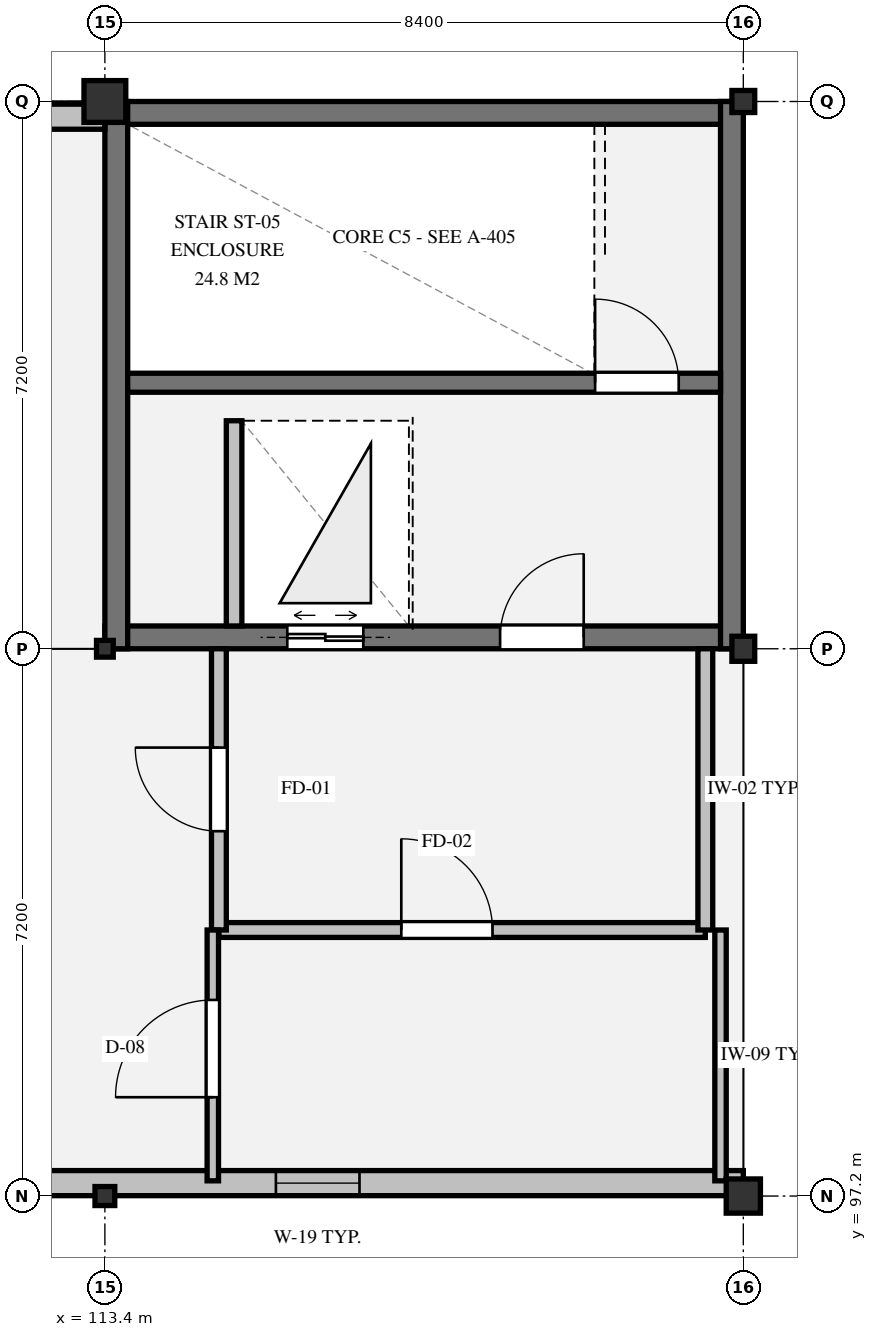
"""IFC4 building model, lengths in metres.
Left out: names, types, materials, properties, quantities, classifications, styles, units other than length and angle.
Written with IfcOpenShell. Run it as: python <this file> out.ifc"""

import sys

from ifc_helpers import new_model, si_unit, direction, frame, frame_2d, origin, origin_2d, place, context, subcontext, project, spatial, rectangle, hollow_rectangle, i_section, extrude, element, fill, save


model = new_model("IFC4")
c1 = context("Model", 3, precision=1e-05, world=origin(), true_north=direction((0.0, 1.0)))
c2 = subcontext(c1, "Body", "Model", "MODEL_VIEW")
j1 = project(units=[si_unit("LENGTHUNIT", "METRE"), si_unit("PLANEANGLEUNIT", "RADIAN")], contexts=[c1])
p1 = place(None, origin())
s1 = spatial("IfcSite", under=j1, at=p1, CompositionType="ELEMENT")
p2 = place(p1, origin())
s2 = spatial("IfcBuilding", under=s1, at=p2, CompositionType="ELEMENT")
p3 = place(p2, frame((0.0, 0.0, 29.4)))
s3 = spatial("IfcBuildingStorey", under=s2, at=p3, CompositionType="ELEMENT", Elevation=29.4)
p4 = place(p3, frame((113.4, 111.45, 0.0), z_axis=(0.0, 0.0, 1.0), x_axis=(1.0, 0.0, 0.0)))
e1 = element("IfcWall", 1, at=p4, inside=s3, PredefinedType="SHEAR", context=c2, shape_type="SweptSolid", body=[
    extrude(rectangle(XDim=8.4, YDim=0.3, at=frame_2d((4.2, 0.0))), origin(), (0.0, 0.0, 1.0), 4.5),
])
p5 = place(p3, frame((113.4, 104.55, 0.0), z_axis=(0.0, 0.0, 1.0), x_axis=(1.0, 0.0, 0.0)))
e2 = element("IfcWall", 2, at=p5, inside=s3, PredefinedType="SHEAR", context=c2, shape_type="SweptSolid", body=[
    extrude(rectangle(XDim=8.4, YDim=0.3, at=frame_2d((4.2, 0.0))), origin(), (0.0, 0.0, 1.0), 4.5),
])
p6 = place(p5, frame((5.2, 0.0, 0.0)))
e3 = element("IfcOpeningElement", 3, at=p6, cuts=e2, PredefinedType="OPENING", context=c2, shape_type="SweptSolid", body=[
    extrude(rectangle(XDim=1.1, YDim=2.15, at=frame_2d((0.55, 1.075))), frame((0.0, 0.16, 0.0), z_axis=(0.0, -1.0, 0.0), x_axis=(1.0, 0.0, 0.0)), (0.0, 0.0, 1.0), 0.32),
])
p7 = place(p5, frame((2.4, 0.0, 0.0)))
e4 = element("IfcOpeningElement", 4, at=p7, cuts=e2, PredefinedType="OPENING", context=c2, shape_type="SweptSolid", body=[
    extrude(rectangle(XDim=1.0, YDim=2.1, at=frame_2d((0.5, 1.05))), frame((0.0, 0.16, 0.0), z_axis=(0.0, -1.0, 0.0), x_axis=(1.0, 0.0, 0.0)), (0.0, 0.0, 1.0), 0.32),
])
for number, where, z_axis, x_axis in (
    (5, (113.55, 104.4, 0.0), (0.0, 0.0, 1.0), (0.0, 1.0, 0.0)),
    (6, (121.65, 111.6, 0.0), (0.0, 0.0, 1.0), (0.0, -1.0, 0.0)),
):
    element("IfcWall", number, at=place(p3, frame(where, z_axis=z_axis, x_axis=x_axis)), inside=s3, PredefinedType="SHEAR", context=c2, shape_type="SweptSolid", body=[
        extrude(rectangle(XDim=7.2, YDim=0.3, at=frame_2d((3.6, 0.0))), origin(), (0.0, 0.0, 1.0), 4.5),
    ])
p8 = place(p3, frame((113.7, 107.9, 0.0), z_axis=(0.0, 0.0, 1.0), x_axis=(1.0, 0.0, 0.0)))
e7 = element("IfcWall", 7, at=p8, inside=s3, PredefinedType="SHEAR", context=c2, shape_type="SweptSolid", body=[
    extrude(rectangle(XDim=7.8, YDim=0.25, at=frame_2d((3.9, 0.0))), origin(), (0.0, 0.0, 1.0), 4.5),
])
p9 = place(p8, frame((6.15, 0.0, 0.0)))
e8 = element("IfcOpeningElement", 8, at=p9, cuts=e7, PredefinedType="OPENING", context=c2, shape_type="SweptSolid", body=[
    extrude(rectangle(XDim=1.1, YDim=2.15, at=frame_2d((0.55, 1.075))), frame((0.0, 0.135, 0.0), z_axis=(0.0, -1.0, 0.0), x_axis=(1.0, 0.0, 0.0)), (0.0, 0.0, 1.0), 0.27),
])
p10 = place(p3, frame((113.4, 97.2, 0.0), z_axis=(0.0, 0.0, 1.0), x_axis=(1.0, 0.0, 0.0)))
e9 = element("IfcColumn", 9, at=p10, inside=s3, PredefinedType="COLUMN", context=c2, shape_type="SweptSolid", body=[
    extrude(i_section(OverallWidth=0.26, OverallDepth=0.25, WebThickness=0.008, FlangeThickness=0.012, FilletRadius=0.024, at=origin_2d()), origin(), (0.0, 0.0, 1.0), 4.5),
])
p11 = place(p3, frame((113.4, 104.4, 0.0), z_axis=(0.0, 0.0, 1.0), x_axis=(1.0, 0.0, 0.0)))
e10 = element("IfcColumn", 10, at=p11, inside=s3, PredefinedType="COLUMN", context=c2, shape_type="SweptSolid", body=[
    extrude(hollow_rectangle(XDim=0.22, YDim=0.22, WallThickness=0.012, InnerFilletRadius=0.019, OuterFilletRadius=0.031, at=origin_2d()), origin(), (0.0, 0.0, 1.0), 4.5),
])
p12 = place(p3, frame((113.4, 111.6, 0.0), z_axis=(0.0, 0.0, 1.0), x_axis=(1.0, 0.0, 0.0)))
e11 = element("IfcColumn", 11, at=p12, inside=s3, PredefinedType="COLUMN", context=c2, shape_type="SweptSolid", body=[
    extrude(rectangle(XDim=0.55, YDim=0.55, at=origin_2d()), origin(), (0.0, 0.0, 1.0), 4.5),
])
p13 = place(p3, frame((121.8, 97.2, 0.0), z_axis=(0.0, 0.0, 1.0), x_axis=(1.0, 0.0, 0.0)))
e12 = element("IfcColumn", 12, at=p13, inside=s3, PredefinedType="COLUMN", context=c2, shape_type="SweptSolid", body=[
    extrude(rectangle(XDim=0.45, YDim=0.45, at=origin_2d()), origin(), (0.0, 0.0, 1.0), 4.5),
])
p14 = place(p3, frame((121.8, 104.4, 0.0), z_axis=(0.0, 0.0, 1.0), x_axis=(1.0, 0.0, 0.0)))
e13 = element("IfcColumn", 13, at=p14, inside=s3, PredefinedType="COLUMN", context=c2, shape_type="SweptSolid", body=[
    extrude(i_section(OverallWidth=0.3, OverallDepth=0.33, WebThickness=0.01, FlangeThickness=0.017, FilletRadius=0.027, at=origin_2d()), origin(), (0.0, 0.0, 1.0), 4.95),
])
p15 = place(p3, frame((121.8, 111.6, 0.0), z_axis=(0.0, 0.0, 1.0), x_axis=(1.0, 0.0, 0.0)))
e14 = element("IfcColumn", 14, at=p15, inside=s3, PredefinedType="COLUMN", context=c2, shape_type="SweptSolid", body=[
    extrude(i_section(OverallWidth=0.3, OverallDepth=0.29, WebThickness=0.009, FlangeThickness=0.014, FilletRadius=0.027, at=origin_2d()), origin(), (0.0, 0.0, 1.0), 4.5),
])
p16 = place(p3, frame((121.8, 97.37, 0.0), z_axis=(0.0, 0.0, 1.0), x_axis=(-1.0, 0.0, 0.0)))
e15 = element("IfcWall", 15, at=p16, inside=s3, PredefinedType="SOLIDWALL", context=c2, shape_type="SweptSolid", body=[
    extrude(rectangle(XDim=16.8, YDim=0.33, at=frame_2d((8.4, 0.0))), origin(), (0.0, 0.0, 1.0), 4.24),
])
p17 = place(p16, frame((5.05, 0.0, 0.85)))
e16 = element("IfcOpeningElement", 16, at=p17, cuts=e15, PredefinedType="OPENING", context=c2, shape_type="SweptSolid", body=[
    extrude(rectangle(XDim=1.1, YDim=1.4, at=frame_2d((0.55, 0.7))), frame((0.0, 0.175, 0.0), z_axis=(0.0, -1.0, 0.0), x_axis=(1.0, 0.0, 0.0)), (0.0, 0.0, 1.0), 0.35),
])
p18 = place(p16, frame((10.375, 0.0, 0.85)))
e17 = element("IfcOpeningElement", 17, at=p18, cuts=e15, PredefinedType="OPENING", context=c2, shape_type="SweptSolid", body=[
    extrude(rectangle(XDim=1.65, YDim=1.45, at=frame_2d((0.825, 0.725))), frame((0.0, 0.175, 0.0), z_axis=(0.0, -1.0, 0.0), x_axis=(1.0, 0.0, 0.0)), (0.0, 0.0, 1.0), 0.35),
])
p19 = place(p3, frame((105.0, 111.4, 0.0), z_axis=(0.0, 0.0, 1.0), x_axis=(1.0, 0.0, 0.0)))
e18 = element("IfcWall", 18, at=p19, inside=s3, PredefinedType="SOLIDWALL", context=c2, shape_type="SweptSolid", body=[
    extrude(rectangle(XDim=8.4, YDim=0.33, at=frame_2d((4.2, 0.0))), origin(), (0.0, 0.0, 1.0), 4.24),
])
p20 = place(p3, frame((115.1, 104.7, 0.0), z_axis=(0.0, 0.0, 1.0), x_axis=(0.0, 1.0, 0.0)))
e19 = element("IfcWall", 19, at=p20, inside=s3, PredefinedType="PARTITIONING", context=c2, shape_type="SweptSolid", body=[
    extrude(rectangle(XDim=2.7, YDim=0.205, at=frame_2d((1.35, 0.0))), origin(), (0.0, 0.0, 1.0), 4.23),
])
p21 = place(p3, frame((114.9, 100.7, 0.0), z_axis=(0.0, 0.0, 1.0), x_axis=(1.0, 0.0, 0.0)))
e20 = element("IfcWall", 20, at=p21, inside=s3, PredefinedType="PARTITIONING", context=c2, shape_type="SweptSolid", body=[
    extrude(rectangle(XDim=6.4, YDim=0.195, at=frame_2d((3.2, 0.0))), origin(), (0.0, 0.0, 1.0), 4.23),
])
p22 = place(p21, frame((2.4, 0.0, 0.0)))
e21 = element("IfcOpeningElement", 21, at=p22, cuts=e20, PredefinedType="OPENING", context=c2, shape_type="SweptSolid", body=[
    extrude(rectangle(XDim=1.2, YDim=2.15, at=frame_2d((0.6, 1.075))), frame((0.0, 0.107, 0.0), z_axis=(0.0, -1.0, 0.0), x_axis=(1.0, 0.0, 0.0)), (0.0, 0.0, 1.0), 0.215),
])
p23 = place(p3, frame((121.3, 100.7, 0.0), z_axis=(0.0, 0.0, 1.0), x_axis=(0.0, 1.0, 0.0)))
e22 = element("IfcWall", 22, at=p23, inside=s3, PredefinedType="PARTITIONING", context=c2, shape_type="SweptSolid", body=[
    extrude(rectangle(XDim=3.7, YDim=0.195, at=frame_2d((1.85, 0.0))), origin(), (0.0, 0.0, 1.0), 4.23),
])
p24 = place(p3, frame((114.9, 100.7, 0.0), z_axis=(0.0, 0.0, 1.0), x_axis=(0.0, 1.0, 0.0)))
e23 = element("IfcWall", 23, at=p24, inside=s3, PredefinedType="PARTITIONING", context=c2, shape_type="SweptSolid", body=[
    extrude(rectangle(XDim=3.7, YDim=0.195, at=frame_2d((1.85, 0.0))), origin(), (0.0, 0.0, 1.0), 4.23),
])
p25 = place(p24, frame((1.3, 0.0, 0.0)))
e24 = element("IfcOpeningElement", 24, at=p25, cuts=e23, PredefinedType="OPENING", context=c2, shape_type="SweptSolid", body=[
    extrude(rectangle(XDim=1.1, YDim=2.15, at=frame_2d((0.55, 1.075))), frame((0.0, 0.107, 0.0), z_axis=(0.0, -1.0, 0.0), x_axis=(1.0, 0.0, 0.0)), (0.0, 0.0, 1.0), 0.215),
])
p26 = place(p3, frame((114.82, 97.4, 0.0), z_axis=(0.0, 0.0, 1.0), x_axis=(0.0, 1.0, 0.0)))
e25 = element("IfcWall", 25, at=p26, inside=s3, PredefinedType="PARTITIONING", context=c2, shape_type="SweptSolid", body=[
    extrude(rectangle(XDim=3.3, YDim=0.15, at=frame_2d((1.65, 0.0))), origin(), (0.0, 0.0, 1.0), 4.23),
])
p27 = place(p26, frame((1.1, 0.0, 0.0)))
e26 = element("IfcOpeningElement", 26, at=p27, cuts=e25, PredefinedType="OPENING", context=c2, shape_type="SweptSolid", body=[
    extrude(rectangle(XDim=1.28, YDim=2.22, at=frame_2d((0.64, 1.11))), frame((0.0, 0.085, 0.0), z_axis=(0.0, -1.0, 0.0), x_axis=(1.0, 0.0, 0.0)), (0.0, 0.0, 1.0), 0.17),
])
p28 = place(p3, frame((121.5, 100.7, 0.0), z_axis=(0.0, 0.0, 1.0), x_axis=(0.0, -1.0, 0.0)))
e27 = element("IfcWall", 27, at=p28, inside=s3, PredefinedType="PARTITIONING", context=c2, shape_type="SweptSolid", body=[
    extrude(rectangle(XDim=3.3, YDim=0.15, at=frame_2d((1.65, 0.0))), origin(), (0.0, 0.0, 1.0), 4.23),
])
p29 = place(p17, origin())
e28 = element("IfcWindow", 28, at=p29, inside=s3, PartitioningType="SINGLE_PANEL", PredefinedType="WINDOW", context=c2, shape_type="SweptSolid", body=[
    extrude(rectangle(XDim=1.1, YDim=1.4, at=frame_2d((0.55, 0.7))), frame((0.0, 0.03, 0.0), z_axis=(0.0, -1.0, 0.0), x_axis=(1.0, 0.0, 0.0)), (0.0, 0.0, 1.0), 0.06),
])
fill(e16, e28)
p30 = place(p9, origin())
e29 = element("IfcDoor", 29, at=p30, inside=s3, OperationType="SINGLE_SWING_LEFT", PredefinedType="DOOR", context=c2, shape_type="SweptSolid", body=[
    extrude(rectangle(XDim=1.1, YDim=2.15, at=frame_2d((0.55, 1.075))), frame((0.0, 0.025, 0.0), z_axis=(0.0, -1.0, 0.0), x_axis=(1.0, 0.0, 0.0)), (0.0, 0.0, 1.0), 0.05),
])
fill(e8, e29)
p31 = place(p6, origin())
e30 = element("IfcDoor", 30, at=p31, inside=s3, OperationType="SINGLE_SWING_RIGHT", PredefinedType="DOOR", context=c2, shape_type="SweptSolid", body=[
    extrude(rectangle(XDim=1.1, YDim=2.15, at=frame_2d((0.55, 1.075))), frame((0.0, 0.025, 0.0), z_axis=(0.0, -1.0, 0.0), x_axis=(1.0, 0.0, 0.0)), (0.0, 0.0, 1.0), 0.05),
])
fill(e3, e30)
p32 = place(p7, origin())
e31 = element("IfcDoor", 31, at=p32, inside=s3, OperationType="DOUBLE_DOOR_SLIDING", PredefinedType="DOOR", context=c2, shape_type="SweptSolid", body=[
    extrude(rectangle(XDim=1.0, YDim=2.1, at=frame_2d((0.5, 1.05))), frame((0.0, 0.025, 0.0), z_axis=(0.0, -1.0, 0.0), x_axis=(1.0, 0.0, 0.0)), (0.0, 0.0, 1.0), 0.05),
])
fill(e4, e31)
p33 = place(p22, origin())
e32 = element("IfcDoor", 32, at=p33, inside=s3, OperationType="SINGLE_SWING_LEFT", PredefinedType="DOOR", context=c2, shape_type="SweptSolid", body=[
    extrude(rectangle(XDim=1.2, YDim=2.15, at=frame_2d((0.6, 1.075))), frame((0.0, 0.025, 0.0), z_axis=(0.0, -1.0, 0.0), x_axis=(1.0, 0.0, 0.0)), (0.0, 0.0, 1.0), 0.05),
])
fill(e21, e32)
p34 = place(p25, origin())
e33 = element("IfcDoor", 33, at=p34, inside=s3, OperationType="SINGLE_SWING_RIGHT", PredefinedType="DOOR", context=c2, shape_type="SweptSolid", body=[
    extrude(rectangle(XDim=1.1, YDim=2.15, at=frame_2d((0.55, 1.075))), frame((0.0, 0.025, 0.0), z_axis=(0.0, -1.0, 0.0), x_axis=(1.0, 0.0, 0.0)), (0.0, 0.0, 1.0), 0.05),
])
fill(e24, e33)
p35 = place(p27, origin())
e34 = element("IfcDoor", 34, at=p35, inside=s3, OperationType="SINGLE_SWING_LEFT", PredefinedType="DOOR", context=c2, shape_type="SweptSolid", body=[
    extrude(rectangle(XDim=1.28, YDim=2.22, at=frame_2d((0.64, 1.11))), frame((0.0, 0.025, 0.0), z_axis=(0.0, -1.0, 0.0), x_axis=(1.0, 0.0, 0.0)), (0.0, 0.0, 1.0), 0.05),
])
fill(e26, e34)
save(model, sys.argv[1])
